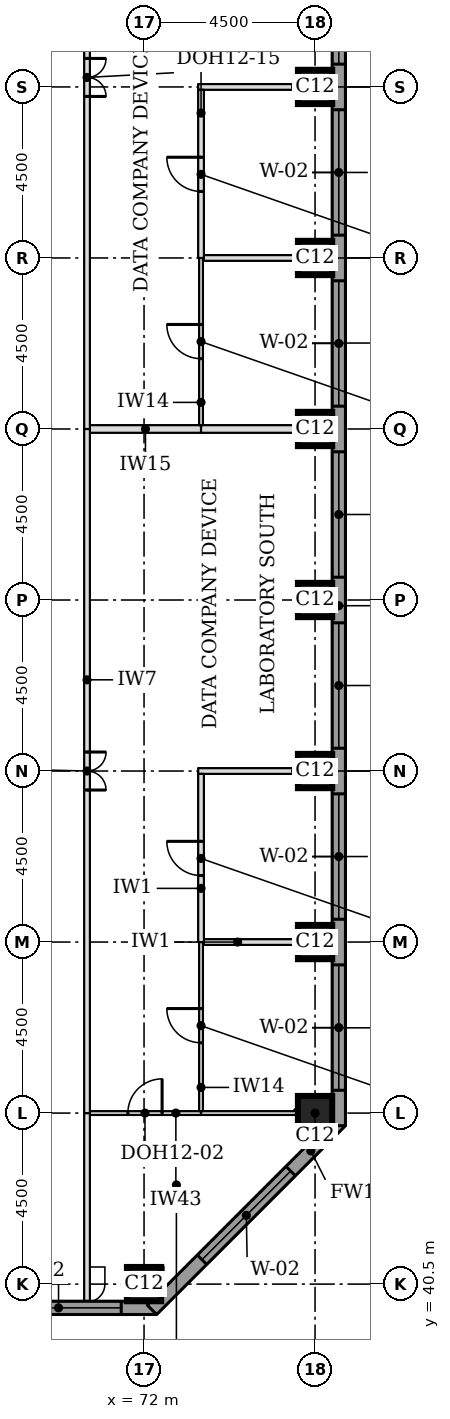
"""IFC4 building model, lengths in metres.
Left out: names, types, materials, properties, quantities, classifications, styles, units other than length and angle.
Written with IfcOpenShell. Run it as: python <this file> out.ifc"""

import sys

from ifc_helpers import new_model, si_unit, direction, frame, frame_2d, origin, origin_2d, place, context, subcontext, project, spatial, rectangle, extrude, element, fill, save


model = new_model("IFC4")
c1 = context("Model", 3, precision=1e-05, world=origin(), true_north=direction((0.0, 1.0)))
c2 = subcontext(c1, "Body", "Model", "MODEL_VIEW")
j1 = project(units=[si_unit("LENGTHUNIT", "METRE"), si_unit("PLANEANGLEUNIT", "RADIAN")], contexts=[c1])
p1 = place(None, origin())
s1 = spatial("IfcSite", under=j1, at=p1, CompositionType="ELEMENT")
p2 = place(p1, origin())
s2 = spatial("IfcBuilding", under=s1, at=p2, CompositionType="ELEMENT")
p3 = place(p2, frame((0.0, 0.0, 252.6)))
s3 = spatial("IfcBuildingStorey", under=s2, at=p3, CompositionType="ELEMENT", Elevation=252.6)
for number, where, z_axis, x_axis in (
    (1, (72.0, 40.5, 0.0), (0.0, 0.0, 1.0), (1.0, 0.0, 0.0)),
    (2, (76.5, 45.0, 0.0), (0.0, 0.0, 1.0), (1.0, 0.0, 0.0)),
    (3, (76.5, 49.5, 0.0), (0.0, 0.0, 1.0), (1.0, 0.0, 0.0)),
    (4, (76.5, 54.0, 0.0), (0.0, 0.0, 1.0), (1.0, 0.0, 0.0)),
    (5, (76.5, 58.5, 0.0), (0.0, 0.0, 1.0), (1.0, 0.0, 0.0)),
    (6, (76.5, 63.0, 0.0), (0.0, 0.0, 1.0), (1.0, 0.0, 0.0)),
    (7, (76.5, 67.5, 0.0), (0.0, 0.0, 1.0), (1.0, 0.0, 0.0)),
    (8, (76.5, 72.0, 0.0), (0.0, 0.0, 1.0), (1.0, 0.0, 0.0)),
):
    element("IfcColumn", number, at=place(p3, frame(where, z_axis=z_axis, x_axis=x_axis)), inside=s3, PredefinedType="COLUMN", context=c2, shape_type="SweptSolid", body=[
        extrude(rectangle(XDim=0.9, YDim=0.9, at=origin_2d()), origin(), (0.0, 0.0, 1.0), 3.7),
    ])
p4 = place(p3, frame((36.0, 39.875, 0.0), z_axis=(0.0, 0.0, 1.0), x_axis=(1.0, 0.0, 0.0)))
e9 = element("IfcWall", 9, at=p4, inside=s3, PredefinedType="STANDARD", context=c2, shape_type="SweptSolid", body=[
    extrude(rectangle(XDim=36.331, YDim=0.35, at=frame_2d((18.166, 0.0))), origin(), (0.0, 0.0, 1.0), 3.525),
])
p5 = place(p4, frame((0.6, 0.0, 0.9)))
e10 = element("IfcOpeningElement", 10, at=p5, cuts=e9, PredefinedType="OPENING", context=c2, shape_type="SweptSolid", body=[
    extrude(rectangle(XDim=3.3, YDim=1.9, at=frame_2d((1.65, 0.95))), frame((0.0, 0.185, 0.0), z_axis=(0.0, -1.0, 0.0), x_axis=(1.0, 0.0, 0.0)), (0.0, 0.0, 1.0), 0.37),
])
p6 = place(p4, frame((5.1, 0.0, 0.9)))
e11 = element("IfcOpeningElement", 11, at=p6, cuts=e9, PredefinedType="OPENING", context=c2, shape_type="SweptSolid", body=[
    extrude(rectangle(XDim=3.3, YDim=1.9, at=frame_2d((1.65, 0.95))), frame((0.0, 0.185, 0.0), z_axis=(0.0, -1.0, 0.0), x_axis=(1.0, 0.0, 0.0)), (0.0, 0.0, 1.0), 0.37),
])
p7 = place(p4, frame((9.6, 0.0, 0.9)))
e12 = element("IfcOpeningElement", 12, at=p7, cuts=e9, PredefinedType="OPENING", context=c2, shape_type="SweptSolid", body=[
    extrude(rectangle(XDim=3.3, YDim=1.9, at=frame_2d((1.65, 0.95))), frame((0.0, 0.185, 0.0), z_axis=(0.0, -1.0, 0.0), x_axis=(1.0, 0.0, 0.0)), (0.0, 0.0, 1.0), 0.37),
])
p8 = place(p4, frame((14.1, 0.0, 0.9)))
e13 = element("IfcOpeningElement", 13, at=p8, cuts=e9, PredefinedType="OPENING", context=c2, shape_type="SweptSolid", body=[
    extrude(rectangle(XDim=3.3, YDim=1.9, at=frame_2d((1.65, 0.95))), frame((0.0, 0.185, 0.0), z_axis=(0.0, -1.0, 0.0), x_axis=(1.0, 0.0, 0.0)), (0.0, 0.0, 1.0), 0.37),
])
p9 = place(p4, frame((18.6, 0.0, 0.9)))
e14 = element("IfcOpeningElement", 14, at=p9, cuts=e9, PredefinedType="OPENING", context=c2, shape_type="SweptSolid", body=[
    extrude(rectangle(XDim=3.3, YDim=1.9, at=frame_2d((1.65, 0.95))), frame((0.0, 0.185, 0.0), z_axis=(0.0, -1.0, 0.0), x_axis=(1.0, 0.0, 0.0)), (0.0, 0.0, 1.0), 0.37),
])
p10 = place(p4, frame((23.1, 0.0, 0.9)))
e15 = element("IfcOpeningElement", 15, at=p10, cuts=e9, PredefinedType="OPENING", context=c2, shape_type="SweptSolid", body=[
    extrude(rectangle(XDim=3.3, YDim=1.9, at=frame_2d((1.65, 0.95))), frame((0.0, 0.185, 0.0), z_axis=(0.0, -1.0, 0.0), x_axis=(1.0, 0.0, 0.0)), (0.0, 0.0, 1.0), 0.37),
])
p11 = place(p4, frame((27.6, 0.0, 0.9)))
e16 = element("IfcOpeningElement", 16, at=p11, cuts=e9, PredefinedType="OPENING", context=c2, shape_type="SweptSolid", body=[
    extrude(rectangle(XDim=3.3, YDim=1.9, at=frame_2d((1.65, 0.95))), frame((0.0, 0.185, 0.0), z_axis=(0.0, -1.0, 0.0), x_axis=(1.0, 0.0, 0.0)), (0.0, 0.0, 1.0), 0.37),
])
p12 = place(p4, frame((32.1, 0.0, 0.9)))
e17 = element("IfcOpeningElement", 17, at=p12, cuts=e9, PredefinedType="OPENING", context=c2, shape_type="SweptSolid", body=[
    extrude(rectangle(XDim=3.3, YDim=1.9, at=frame_2d((1.65, 0.95))), frame((0.0, 0.185, 0.0), z_axis=(0.0, -1.0, 0.0), x_axis=(1.0, 0.0, 0.0)), (0.0, 0.0, 1.0), 0.37),
])
p13 = place(p3, frame((72.208, 39.824, 0.0), z_axis=(0.0, 0.0, 1.0), x_axis=(0.707106781187, 0.707106781187, 0.0)))
e18 = element("IfcWall", 18, at=p13, inside=s3, PredefinedType="STANDARD", context=c2, shape_type="SweptSolid", body=[
    extrude(rectangle(XDim=7.027, YDim=0.35, at=frame_2d((3.513, 0.0))), origin(), (0.0, 0.0, 1.0), 3.525),
])
p14 = place(p13, frame((1.863, 0.0, 0.9)))
e19 = element("IfcOpeningElement", 19, at=p14, cuts=e18, PredefinedType="OPENING", context=c2, shape_type="SweptSolid", body=[
    extrude(rectangle(XDim=3.3, YDim=1.9, at=frame_2d((1.65, 0.95))), frame((0.0, 0.185, 0.0), z_axis=(0.0, -1.0, 0.0), x_axis=(1.0, 0.0, 0.0)), (0.0, 0.0, 1.0), 0.37),
])
p15 = place(p3, frame((77.125, 44.669, 0.0), z_axis=(0.0, 0.0, 1.0), x_axis=(0.0, 1.0, 0.0)))
e20 = element("IfcWall", 20, at=p15, inside=s3, PredefinedType="STANDARD", context=c2, shape_type="SweptSolid", body=[
    extrude(rectangle(XDim=32.163, YDim=0.35, at=frame_2d((16.081, 0.0))), origin(), (0.0, 0.0, 1.0), 3.525),
])
p16 = place(p15, frame((0.931, 0.0, 0.9)))
e21 = element("IfcOpeningElement", 21, at=p16, cuts=e20, PredefinedType="OPENING", context=c2, shape_type="SweptSolid", body=[
    extrude(rectangle(XDim=3.3, YDim=1.9, at=frame_2d((1.65, 0.95))), frame((0.0, 0.185, 0.0), z_axis=(0.0, -1.0, 0.0), x_axis=(1.0, 0.0, 0.0)), (0.0, 0.0, 1.0), 0.37),
])
p17 = place(p15, frame((5.431, 0.0, 0.9)))
e22 = element("IfcOpeningElement", 22, at=p17, cuts=e20, PredefinedType="OPENING", context=c2, shape_type="SweptSolid", body=[
    extrude(rectangle(XDim=3.3, YDim=1.9, at=frame_2d((1.65, 0.95))), frame((0.0, 0.185, 0.0), z_axis=(0.0, -1.0, 0.0), x_axis=(1.0, 0.0, 0.0)), (0.0, 0.0, 1.0), 0.37),
])
p18 = place(p15, frame((9.931, 0.0, 0.9)))
e23 = element("IfcOpeningElement", 23, at=p18, cuts=e20, PredefinedType="OPENING", context=c2, shape_type="SweptSolid", body=[
    extrude(rectangle(XDim=3.3, YDim=1.9, at=frame_2d((1.65, 0.95))), frame((0.0, 0.185, 0.0), z_axis=(0.0, -1.0, 0.0), x_axis=(1.0, 0.0, 0.0)), (0.0, 0.0, 1.0), 0.37),
])
p19 = place(p15, frame((14.431, 0.0, 0.9)))
e24 = element("IfcOpeningElement", 24, at=p19, cuts=e20, PredefinedType="OPENING", context=c2, shape_type="SweptSolid", body=[
    extrude(rectangle(XDim=3.3, YDim=1.9, at=frame_2d((1.65, 0.95))), frame((0.0, 0.185, 0.0), z_axis=(0.0, -1.0, 0.0), x_axis=(1.0, 0.0, 0.0)), (0.0, 0.0, 1.0), 0.37),
])
p20 = place(p15, frame((18.931, 0.0, 0.9)))
e25 = element("IfcOpeningElement", 25, at=p20, cuts=e20, PredefinedType="OPENING", context=c2, shape_type="SweptSolid", body=[
    extrude(rectangle(XDim=3.3, YDim=1.9, at=frame_2d((1.65, 0.95))), frame((0.0, 0.185, 0.0), z_axis=(0.0, -1.0, 0.0), x_axis=(1.0, 0.0, 0.0)), (0.0, 0.0, 1.0), 0.37),
])
p21 = place(p15, frame((23.431, 0.0, 0.9)))
e26 = element("IfcOpeningElement", 26, at=p21, cuts=e20, PredefinedType="OPENING", context=c2, shape_type="SweptSolid", body=[
    extrude(rectangle(XDim=3.3, YDim=1.9, at=frame_2d((1.65, 0.95))), frame((0.0, 0.185, 0.0), z_axis=(0.0, -1.0, 0.0), x_axis=(1.0, 0.0, 0.0)), (0.0, 0.0, 1.0), 0.37),
])
p22 = place(p15, frame((27.931, 0.0, 0.9)))
e27 = element("IfcOpeningElement", 27, at=p22, cuts=e20, PredefinedType="OPENING", context=c2, shape_type="SweptSolid", body=[
    extrude(rectangle(XDim=3.3, YDim=1.9, at=frame_2d((1.65, 0.95))), frame((0.0, 0.185, 0.0), z_axis=(0.0, -1.0, 0.0), x_axis=(1.0, 0.0, 0.0)), (0.0, 0.0, 1.0), 0.37),
])
p23 = place(p3, frame((70.575, 45.0, 0.0), z_axis=(0.0, 0.0, 1.0), x_axis=(1.0, 0.0, 0.0)))
e28 = element("IfcWall", 28, at=p23, inside=s3, PredefinedType="PARTITIONING", context=c2, shape_type="SweptSolid", body=[
    extrude(rectangle(XDim=2.925, YDim=0.1, at=frame_2d((1.462, 0.0))), origin(), (0.0, 0.0, 1.0), 3.096),
])
p24 = place(p23, frame((1.0, 0.0, 0.0)))
e29 = element("IfcOpeningElement", 29, at=p24, cuts=e28, PredefinedType="OPENING", context=c2, shape_type="SweptSolid", body=[
    extrude(rectangle(XDim=0.9, YDim=2.1, at=frame_2d((0.45, 1.05))), frame((0.0, 0.06, 0.0), z_axis=(0.0, -1.0, 0.0), x_axis=(1.0, 0.0, 0.0)), (0.0, 0.0, 1.0), 0.12),
])
p25 = place(p3, frame((73.5, 45.0, 0.0), z_axis=(0.0, 0.0, 1.0), x_axis=(1.0, 0.0, 0.0)))
e30 = element("IfcWall", 30, at=p25, inside=s3, PredefinedType="PARTITIONING", context=c2, shape_type="SweptSolid", body=[
    extrude(rectangle(XDim=2.55, YDim=0.1, at=frame_2d((1.275, 0.0))), origin(), (0.0, 0.0, 1.0), 3.096),
])
p26 = place(p3, frame((73.575, 49.5, 0.0), z_axis=(0.0, 0.0, 1.0), x_axis=(1.0, 0.0, 0.0)))
e31 = element("IfcWall", 31, at=p26, inside=s3, PredefinedType="PARTITIONING", context=c2, shape_type="SweptSolid", body=[
    extrude(rectangle(XDim=3.375, YDim=0.15, at=frame_2d((1.688, 0.0))), origin(), (0.0, 0.0, 1.0), 3.55),
])
p27 = place(p3, frame((73.425, 54.0, 0.0), z_axis=(0.0, 0.0, 1.0), x_axis=(1.0, 0.0, 0.0)))
e32 = element("IfcWall", 32, at=p27, inside=s3, PredefinedType="PARTITIONING", context=c2, shape_type="SweptSolid", body=[
    extrude(rectangle(XDim=3.525, YDim=0.15, at=frame_2d((1.762, 0.0))), origin(), (0.0, 0.0, 1.0), 3.55),
])
p28 = place(p3, frame((70.575, 63.0, 0.0), z_axis=(0.0, 0.0, 1.0), x_axis=(1.0, 0.0, 0.0)))
e33 = element("IfcWall", 33, at=p28, inside=s3, PredefinedType="PARTITIONING", context=c2, shape_type="SweptSolid", body=[
    extrude(rectangle(XDim=2.925, YDim=0.2, at=frame_2d((1.462, 0.0))), origin(), (0.0, 0.0, 1.0), 3.55),
])
p29 = place(p3, frame((73.5, 63.0, 0.0), z_axis=(0.0, 0.0, 1.0), x_axis=(1.0, 0.0, 0.0)))
e34 = element("IfcWall", 34, at=p29, inside=s3, PredefinedType="PARTITIONING", context=c2, shape_type="SweptSolid", body=[
    extrude(rectangle(XDim=3.45, YDim=0.2, at=frame_2d((1.725, 0.0))), origin(), (0.0, 0.0, 1.0), 3.55),
])
p30 = place(p3, frame((73.575, 67.5, 0.0), z_axis=(0.0, 0.0, 1.0), x_axis=(1.0, 0.0, 0.0)))
e35 = element("IfcWall", 35, at=p30, inside=s3, PredefinedType="PARTITIONING", context=c2, shape_type="SweptSolid", body=[
    extrude(rectangle(XDim=3.375, YDim=0.15, at=frame_2d((1.688, 0.0))), origin(), (0.0, 0.0, 1.0), 3.55),
])
p31 = place(p3, frame((73.425, 72.0, 0.0), z_axis=(0.0, 0.0, 1.0), x_axis=(1.0, 0.0, 0.0)))
e36 = element("IfcWall", 36, at=p31, inside=s3, PredefinedType="PARTITIONING", context=c2, shape_type="SweptSolid", body=[
    extrude(rectangle(XDim=3.525, YDim=0.15, at=frame_2d((1.762, 0.0))), origin(), (0.0, 0.0, 1.0), 3.55),
])
p32 = place(p3, frame((70.5, 40.05, 0.0), z_axis=(0.0, 0.0, 1.0), x_axis=(0.0, 1.0, 0.0)))
e37 = element("IfcWall", 37, at=p32, inside=s3, PredefinedType="PARTITIONING", context=c2, shape_type="SweptSolid", body=[
    extrude(rectangle(XDim=4.95, YDim=0.15, at=frame_2d((2.475, 0.0))), origin(), (0.0, 0.0, 1.0), 3.55),
])
p33 = place(p3, frame((70.5, 45.0, 0.0), z_axis=(0.0, 0.0, 1.0), x_axis=(0.0, 1.0, 0.0)))
e38 = element("IfcWall", 38, at=p33, inside=s3, PredefinedType="PARTITIONING", context=c2, shape_type="SweptSolid", body=[
    extrude(rectangle(XDim=18.0, YDim=0.15, at=frame_2d((9.0, 0.0))), origin(), (0.0, 0.0, 1.0), 3.55),
])
p34 = place(p33, frame((8.5, 0.0, 0.0)))
e39 = element("IfcOpeningElement", 39, at=p34, cuts=e38, PredefinedType="OPENING", context=c2, shape_type="SweptSolid", body=[
    extrude(rectangle(XDim=1.0, YDim=2.1, at=frame_2d((0.5, 1.05))), frame((0.0, 0.085, 0.0), z_axis=(0.0, -1.0, 0.0), x_axis=(1.0, 0.0, 0.0)), (0.0, 0.0, 1.0), 0.17),
])
p35 = place(p3, frame((73.5, 45.05, 0.0), z_axis=(0.0, 0.0, 1.0), x_axis=(0.0, 1.0, 0.0)))
e40 = element("IfcWall", 40, at=p35, inside=s3, PredefinedType="PARTITIONING", context=c2, shape_type="SweptSolid", body=[
    extrude(rectangle(XDim=4.45, YDim=0.1, at=frame_2d((2.225, 0.0))), origin(), (0.0, 0.0, 1.0), 3.55),
])
p36 = place(p35, frame((1.8, 0.0, 0.0)))
e41 = element("IfcOpeningElement", 41, at=p36, cuts=e40, PredefinedType="OPENING", context=c2, shape_type="SweptSolid", body=[
    extrude(rectangle(XDim=0.9, YDim=2.1, at=frame_2d((0.45, 1.05))), frame((0.0, 0.06, 0.0), z_axis=(0.0, -1.0, 0.0), x_axis=(1.0, 0.0, 0.0)), (0.0, 0.0, 1.0), 0.12),
])
p37 = place(p3, frame((73.5, 49.5, 0.0), z_axis=(0.0, 0.0, 1.0), x_axis=(0.0, 1.0, 0.0)))
e42 = element("IfcWall", 42, at=p37, inside=s3, PredefinedType="PARTITIONING", context=c2, shape_type="SweptSolid", body=[
    extrude(rectangle(XDim=4.425, YDim=0.15, at=frame_2d((2.212, 0.0))), origin(), (0.0, 0.0, 1.0), 3.55),
])
p38 = place(p37, frame((1.75, 0.0, 0.0)))
e43 = element("IfcOpeningElement", 43, at=p38, cuts=e42, PredefinedType="OPENING", context=c2, shape_type="SweptSolid", body=[
    extrude(rectangle(XDim=0.9, YDim=2.1, at=frame_2d((0.45, 1.05))), frame((0.0, 0.085, 0.0), z_axis=(0.0, -1.0, 0.0), x_axis=(1.0, 0.0, 0.0)), (0.0, 0.0, 1.0), 0.17),
])
p39 = place(p3, frame((70.5, 63.0, 0.0), z_axis=(0.0, 0.0, 1.0), x_axis=(0.0, 1.0, 0.0)))
e44 = element("IfcWall", 44, at=p39, inside=s3, PredefinedType="PARTITIONING", context=c2, shape_type="SweptSolid", body=[
    extrude(rectangle(XDim=18.45, YDim=0.15, at=frame_2d((9.225, 0.0))), origin(), (0.0, 0.0, 1.0), 3.55),
])
p40 = place(p39, frame((8.75, 0.0, 0.0)))
e45 = element("IfcOpeningElement", 45, at=p40, cuts=e44, PredefinedType="OPENING", context=c2, shape_type="SweptSolid", body=[
    extrude(rectangle(XDim=1.0, YDim=2.1, at=frame_2d((0.5, 1.05))), frame((0.0, 0.085, 0.0), z_axis=(0.0, -1.0, 0.0), x_axis=(1.0, 0.0, 0.0)), (0.0, 0.0, 1.0), 0.17),
])
p41 = place(p3, frame((73.5, 63.1, 0.0), z_axis=(0.0, 0.0, 1.0), x_axis=(0.0, 1.0, 0.0)))
e46 = element("IfcWall", 46, at=p41, inside=s3, PredefinedType="PARTITIONING", context=c2, shape_type="SweptSolid", body=[
    extrude(rectangle(XDim=4.4, YDim=0.1, at=frame_2d((2.2, 0.0))), origin(), (0.0, 0.0, 1.0), 3.55),
])
p42 = place(p41, frame((1.75, 0.0, 0.0)))
e47 = element("IfcOpeningElement", 47, at=p42, cuts=e46, PredefinedType="OPENING", context=c2, shape_type="SweptSolid", body=[
    extrude(rectangle(XDim=0.9, YDim=2.1, at=frame_2d((0.45, 1.05))), frame((0.0, 0.06, 0.0), z_axis=(0.0, -1.0, 0.0), x_axis=(1.0, 0.0, 0.0)), (0.0, 0.0, 1.0), 0.12),
])
p43 = place(p3, frame((73.5, 67.5, 0.0), z_axis=(0.0, 0.0, 1.0), x_axis=(0.0, 1.0, 0.0)))
e48 = element("IfcWall", 48, at=p43, inside=s3, PredefinedType="PARTITIONING", context=c2, shape_type="SweptSolid", body=[
    extrude(rectangle(XDim=4.425, YDim=0.15, at=frame_2d((2.212, 0.0))), origin(), (0.0, 0.0, 1.0), 3.55),
])
p44 = place(p43, frame((1.75, 0.0, 0.0)))
e49 = element("IfcOpeningElement", 49, at=p44, cuts=e48, PredefinedType="OPENING", context=c2, shape_type="SweptSolid", body=[
    extrude(rectangle(XDim=0.9, YDim=2.1, at=frame_2d((0.45, 1.05))), frame((0.0, 0.085, 0.0), z_axis=(0.0, -1.0, 0.0), x_axis=(1.0, 0.0, 0.0)), (0.0, 0.0, 1.0), 0.17),
])
p45 = place(p12, origin())
e50 = element("IfcWindow", 50, at=p45, inside=s3, PartitioningType="SINGLE_PANEL", PredefinedType="WINDOW", context=c2, shape_type="SweptSolid", body=[
    extrude(rectangle(XDim=3.3, YDim=1.9, at=frame_2d((1.65, 0.95))), frame((0.0, 0.085, 0.0), z_axis=(0.0, -1.0, 0.0), x_axis=(1.0, 0.0, 0.0)), (0.0, 0.0, 1.0), 0.06),
])
fill(e17, e50)
p46 = place(p14, origin())
e51 = element("IfcWindow", 51, at=p46, inside=s3, PartitioningType="SINGLE_PANEL", PredefinedType="WINDOW", context=c2, shape_type="SweptSolid", body=[
    extrude(rectangle(XDim=3.3, YDim=1.9, at=frame_2d((1.65, 0.95))), frame((0.0, 0.085, 0.0), z_axis=(0.0, -1.0, 0.0), x_axis=(1.0, 0.0, 0.0)), (0.0, 0.0, 1.0), 0.06),
])
fill(e19, e51)
p47 = place(p16, origin())
e52 = element("IfcWindow", 52, at=p47, inside=s3, PartitioningType="SINGLE_PANEL", PredefinedType="WINDOW", context=c2, shape_type="SweptSolid", body=[
    extrude(rectangle(XDim=3.3, YDim=1.9, at=frame_2d((1.65, 0.95))), frame((0.0, 0.085, 0.0), z_axis=(0.0, -1.0, 0.0), x_axis=(1.0, 0.0, 0.0)), (0.0, 0.0, 1.0), 0.06),
])
fill(e21, e52)
p48 = place(p17, origin())
e53 = element("IfcWindow", 53, at=p48, inside=s3, PartitioningType="SINGLE_PANEL", PredefinedType="WINDOW", context=c2, shape_type="SweptSolid", body=[
    extrude(rectangle(XDim=3.3, YDim=1.9, at=frame_2d((1.65, 0.95))), frame((0.0, 0.085, 0.0), z_axis=(0.0, -1.0, 0.0), x_axis=(1.0, 0.0, 0.0)), (0.0, 0.0, 1.0), 0.06),
])
fill(e22, e53)
p49 = place(p18, origin())
e54 = element("IfcWindow", 54, at=p49, inside=s3, PartitioningType="SINGLE_PANEL", PredefinedType="WINDOW", context=c2, shape_type="SweptSolid", body=[
    extrude(rectangle(XDim=3.3, YDim=1.9, at=frame_2d((1.65, 0.95))), frame((0.0, 0.085, 0.0), z_axis=(0.0, -1.0, 0.0), x_axis=(1.0, 0.0, 0.0)), (0.0, 0.0, 1.0), 0.06),
])
fill(e23, e54)
p50 = place(p19, origin())
e55 = element("IfcWindow", 55, at=p50, inside=s3, PartitioningType="SINGLE_PANEL", PredefinedType="WINDOW", context=c2, shape_type="SweptSolid", body=[
    extrude(rectangle(XDim=3.3, YDim=1.9, at=frame_2d((1.65, 0.95))), frame((0.0, 0.085, 0.0), z_axis=(0.0, -1.0, 0.0), x_axis=(1.0, 0.0, 0.0)), (0.0, 0.0, 1.0), 0.06),
])
fill(e24, e55)
p51 = place(p20, origin())
e56 = element("IfcWindow", 56, at=p51, inside=s3, PartitioningType="SINGLE_PANEL", PredefinedType="WINDOW", context=c2, shape_type="SweptSolid", body=[
    extrude(rectangle(XDim=3.3, YDim=1.9, at=frame_2d((1.65, 0.95))), frame((0.0, 0.085, 0.0), z_axis=(0.0, -1.0, 0.0), x_axis=(1.0, 0.0, 0.0)), (0.0, 0.0, 1.0), 0.06),
])
fill(e25, e56)
p52 = place(p21, origin())
e57 = element("IfcWindow", 57, at=p52, inside=s3, PartitioningType="SINGLE_PANEL", PredefinedType="WINDOW", context=c2, shape_type="SweptSolid", body=[
    extrude(rectangle(XDim=3.3, YDim=1.9, at=frame_2d((1.65, 0.95))), frame((0.0, 0.085, 0.0), z_axis=(0.0, -1.0, 0.0), x_axis=(1.0, 0.0, 0.0)), (0.0, 0.0, 1.0), 0.06),
])
fill(e26, e57)
p53 = place(p22, origin())
e58 = element("IfcWindow", 58, at=p53, inside=s3, PartitioningType="SINGLE_PANEL", PredefinedType="WINDOW", context=c2, shape_type="SweptSolid", body=[
    extrude(rectangle(XDim=3.3, YDim=1.9, at=frame_2d((1.65, 0.95))), frame((0.0, 0.085, 0.0), z_axis=(0.0, -1.0, 0.0), x_axis=(1.0, 0.0, 0.0)), (0.0, 0.0, 1.0), 0.06),
])
fill(e27, e58)
p54 = place(p34, frame((1.0, 0.0, 0.0), z_axis=(0.0, 0.0, 1.0), x_axis=(-1.0, 0.0, 0.0)))
e59 = element("IfcDoor", 59, at=p54, inside=s3, OperationType="DOUBLE_DOOR_SINGLE_SWING", PredefinedType="DOOR", context=c2, shape_type="SweptSolid", body=[
    extrude(rectangle(XDim=1.0, YDim=2.1, at=frame_2d((0.5, 1.05))), frame((0.0, 0.025, 0.0), z_axis=(0.0, -1.0, 0.0), x_axis=(1.0, 0.0, 0.0)), (0.0, 0.0, 1.0), 0.05),
])
fill(e39, e59)
p55 = place(p24, origin())
e60 = element("IfcDoor", 60, at=p55, inside=s3, OperationType="SINGLE_SWING_RIGHT", PredefinedType="DOOR", context=c2, shape_type="SweptSolid", body=[
    extrude(rectangle(XDim=0.9, YDim=2.1, at=frame_2d((0.45, 1.05))), frame((0.0, 0.025, 0.0), z_axis=(0.0, -1.0, 0.0), x_axis=(1.0, 0.0, 0.0)), (0.0, 0.0, 1.0), 0.05),
])
fill(e29, e60)
p56 = place(p36, origin())
e61 = element("IfcDoor", 61, at=p56, inside=s3, OperationType="SINGLE_SWING_RIGHT", PredefinedType="DOOR", context=c2, shape_type="SweptSolid", body=[
    extrude(rectangle(XDim=0.9, YDim=2.1, at=frame_2d((0.45, 1.05))), frame((0.0, 0.025, 0.0), z_axis=(0.0, -1.0, 0.0), x_axis=(1.0, 0.0, 0.0)), (0.0, 0.0, 1.0), 0.05),
])
fill(e41, e61)
p57 = place(p38, origin())
e62 = element("IfcDoor", 62, at=p57, inside=s3, OperationType="SINGLE_SWING_RIGHT", PredefinedType="DOOR", context=c2, shape_type="SweptSolid", body=[
    extrude(rectangle(XDim=0.9, YDim=2.1, at=frame_2d((0.45, 1.05))), frame((0.0, 0.025, 0.0), z_axis=(0.0, -1.0, 0.0), x_axis=(1.0, 0.0, 0.0)), (0.0, 0.0, 1.0), 0.05),
])
fill(e43, e62)
p58 = place(p40, frame((1.0, 0.0, 0.0), z_axis=(0.0, 0.0, 1.0), x_axis=(-1.0, 0.0, 0.0)))
e63 = element("IfcDoor", 63, at=p58, inside=s3, OperationType="DOUBLE_DOOR_SINGLE_SWING", PredefinedType="DOOR", context=c2, shape_type="SweptSolid", body=[
    extrude(rectangle(XDim=1.0, YDim=2.1, at=frame_2d((0.5, 1.05))), frame((0.0, 0.025, 0.0), z_axis=(0.0, -1.0, 0.0), x_axis=(1.0, 0.0, 0.0)), (0.0, 0.0, 1.0), 0.05),
])
fill(e45, e63)
p59 = place(p42, origin())
e64 = element("IfcDoor", 64, at=p59, inside=s3, OperationType="SINGLE_SWING_RIGHT", PredefinedType="DOOR", context=c2, shape_type="SweptSolid", body=[
    extrude(rectangle(XDim=0.9, YDim=2.1, at=frame_2d((0.45, 1.05))), frame((0.0, 0.025, 0.0), z_axis=(0.0, -1.0, 0.0), x_axis=(1.0, 0.0, 0.0)), (0.0, 0.0, 1.0), 0.05),
])
fill(e47, e64)
p60 = place(p44, origin())
e65 = element("IfcDoor", 65, at=p60, inside=s3, OperationType="SINGLE_SWING_RIGHT", PredefinedType="DOOR", context=c2, shape_type="SweptSolid", body=[
    extrude(rectangle(XDim=0.9, YDim=2.1, at=frame_2d((0.45, 1.05))), frame((0.0, 0.025, 0.0), z_axis=(0.0, -1.0, 0.0), x_axis=(1.0, 0.0, 0.0)), (0.0, 0.0, 1.0), 0.05),
])
fill(e49, e65)
save(model, sys.argv[1])
